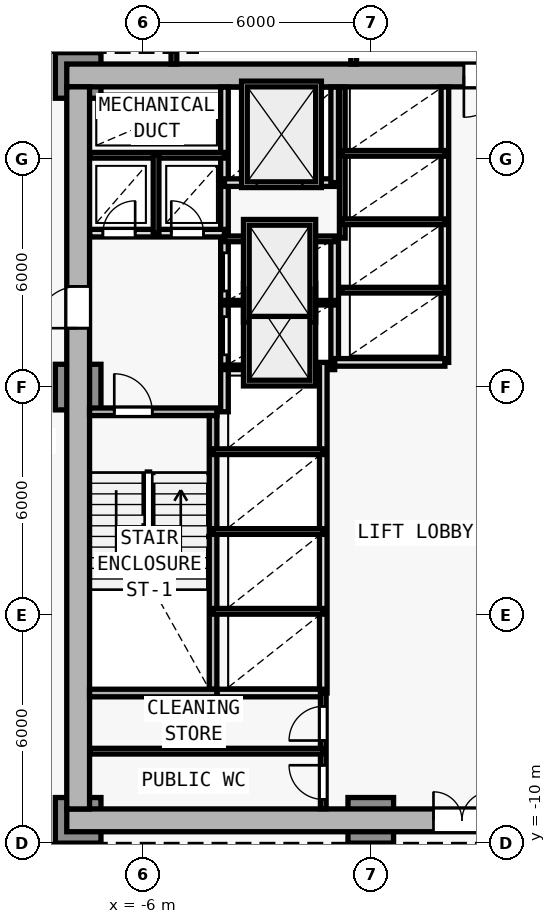
"""IFC4 building model, lengths in metres.
Left out: names, types, materials, properties, quantities, classifications, styles, units other than length and angle.
Written with IfcOpenShell. Run it as: python <this file> out.ifc"""

import sys

from ifc_helpers import new_model, si_unit, direction, frame, frame_2d, origin, origin_2d, place, context, subcontext, project, spatial, rectangle, extrude, element, fill, save


model = new_model("IFC4")
c1 = context("Model", 3, precision=1e-05, world=origin(), true_north=direction((0.0, 1.0)))
c2 = subcontext(c1, "Body", "Model", "MODEL_VIEW")
j1 = project(units=[si_unit("LENGTHUNIT", "METRE"), si_unit("PLANEANGLEUNIT", "RADIAN")], contexts=[c1])
p1 = place(None, origin())
s1 = spatial("IfcSite", under=j1, at=p1, CompositionType="ELEMENT")
p2 = place(p1, origin())
s2 = spatial("IfcBuilding", under=s1, at=p2, CompositionType="ELEMENT")
p3 = place(p2, frame((0.0, 0.0, 5.0)))
s3 = spatial("IfcBuildingStorey", under=s2, at=p3, CompositionType="ELEMENT", Elevation=5.0)
for number, where, z_axis, x_axis in (
    (1, (-7.7, -9.4, 0.0), (0.0, 0.0, 1.0), (1.0, 0.0, 0.0)),
    (2, (-7.7, 10.2, 0.0), (0.0, 0.0, 1.0), (1.0, 0.0, 0.0)),
    (3, (0.0, -9.4, 0.0), (0.0, 0.0, 1.0), (1.0, 0.0, 0.0)),
    (4, (-7.7, 2.0, 0.0), (0.0, 0.0, 1.0), (1.0, 0.0, 0.0)),
):
    element("IfcColumn", number, at=place(p3, frame(where, z_axis=z_axis, x_axis=x_axis)), inside=s3, PredefinedType="COLUMN", context=c2, shape_type="SweptSolid", body=[
        extrude(rectangle(XDim=1.2, YDim=1.2, at=origin_2d()), origin(), (0.0, 0.0, 1.0), 4.2),
    ])
p4 = place(p3, frame((-8.0, -9.4, 0.0), z_axis=(0.0, 0.0, 1.0), x_axis=(1.0, 0.0, 0.0)))
e5 = element("IfcWall", 5, at=p4, inside=s3, PredefinedType="SHEAR", context=c2, shape_type="SweptSolid", body=[
    extrude(rectangle(XDim=16.0, YDim=0.6, at=frame_2d((8.0, 0.0))), origin(), (0.0, 0.0, 1.0), 3.92),
])
p5 = place(p4, frame((9.65, 0.0, 0.0)))
e6 = element("IfcOpeningElement", 6, at=p5, cuts=e5, PredefinedType="OPENING", context=c2, shape_type="SweptSolid", body=[
    extrude(rectangle(XDim=1.5, YDim=2.2, at=frame_2d((0.75, 1.1))), frame((0.0, 0.31, 0.0), z_axis=(0.0, -1.0, 0.0), x_axis=(1.0, 0.0, 0.0)), (0.0, 0.0, 1.0), 0.62),
])
p6 = place(p3, frame((8.0, 10.2, 0.0), z_axis=(0.0, 0.0, 1.0), x_axis=(-1.0, 0.0, 0.0)))
e7 = element("IfcWall", 7, at=p6, inside=s3, PredefinedType="SHEAR", context=c2, shape_type="SweptSolid", body=[
    extrude(rectangle(XDim=16.0, YDim=0.6, at=frame_2d((8.0, 0.0))), origin(), (0.0, 0.0, 1.0), 3.92),
])
p7 = place(p6, frame((4.45, 0.0, 0.0)))
e8 = element("IfcOpeningElement", 8, at=p7, cuts=e7, PredefinedType="OPENING", context=c2, shape_type="SweptSolid", body=[
    extrude(rectangle(XDim=1.1, YDim=2.15, at=frame_2d((0.55, 1.075))), frame((0.0, 0.31, 0.0), z_axis=(0.0, -1.0, 0.0), x_axis=(1.0, 0.0, 0.0)), (0.0, 0.0, 1.0), 0.62),
])
p8 = place(p3, frame((-7.7, -9.1, 0.0), z_axis=(0.0, 0.0, 1.0), x_axis=(0.0, 1.0, 0.0)))
e9 = element("IfcWall", 9, at=p8, inside=s3, PredefinedType="SHEAR", context=c2, shape_type="SweptSolid", body=[
    extrude(rectangle(XDim=19.0, YDim=0.6, at=frame_2d((9.5, 0.0))), origin(), (0.0, 0.0, 1.0), 3.92),
])
p9 = place(p8, frame((12.65, 0.0, 0.0)))
e10 = element("IfcOpeningElement", 10, at=p9, cuts=e9, PredefinedType="OPENING", context=c2, shape_type="SweptSolid", body=[
    extrude(rectangle(XDim=1.1, YDim=2.15, at=frame_2d((0.55, 1.075))), frame((0.0, 0.31, 0.0), z_axis=(0.0, -1.0, 0.0), x_axis=(1.0, 0.0, 0.0)), (0.0, 0.0, 1.0), 0.62),
])
p10 = place(p3, frame((-7.4, 1.35, 0.0), z_axis=(0.0, 0.0, 1.0), x_axis=(1.0, 0.0, 0.0)))
e11 = element("IfcWall", 11, at=p10, inside=s3, PredefinedType="SOLIDWALL", context=c2, shape_type="SweptSolid", body=[
    extrude(rectangle(XDim=3.35, YDim=0.2, at=frame_2d((1.675, 0.0))), origin(), (0.0, 0.0, 1.0), 3.92),
])
p11 = place(p10, frame((0.65, 0.0, 0.0)))
e12 = element("IfcOpeningElement", 12, at=p11, cuts=e11, PredefinedType="OPENING", context=c2, shape_type="SweptSolid", body=[
    extrude(rectangle(XDim=1.0, YDim=2.15, at=frame_2d((0.5, 1.075))), frame((0.0, 0.11, 0.0), z_axis=(0.0, -1.0, 0.0), x_axis=(1.0, 0.0, 0.0)), (0.0, 0.0, 1.0), 0.22),
])
p12 = place(p3, frame((-4.15, -5.95, 0.0), z_axis=(0.0, 0.0, 1.0), x_axis=(0.0, 1.0, 0.0)))
e13 = element("IfcWall", 13, at=p12, inside=s3, PredefinedType="SOLIDWALL", context=c2, shape_type="SweptSolid", body=[
    extrude(rectangle(XDim=7.2, YDim=0.2, at=frame_2d((3.6, 0.0))), origin(), (0.0, 0.0, 1.0), 3.92),
])
p13 = place(p3, frame((-3.85, 1.35, 0.0), z_axis=(0.0, 0.0, 1.0), x_axis=(0.0, 1.0, 0.0)))
e14 = element("IfcWall", 14, at=p13, inside=s3, PredefinedType="SOLIDWALL", context=c2, shape_type="SweptSolid", body=[
    extrude(rectangle(XDim=8.545, YDim=0.2, at=frame_2d((4.272, 0.0))), origin(), (0.0, 0.0, 1.0), 3.92),
])
p14 = place(p13, frame((1.5, 0.0, 0.0)))
e15 = element("IfcOpeningElement", 15, at=p14, cuts=e14, PredefinedType="OPENING", context=c2, shape_type="SweptSolid", body=[
    extrude(rectangle(XDim=1.0, YDim=2.15, at=frame_2d((0.5, 1.075))), frame((0.0, 0.11, 0.0), z_axis=(0.0, -1.0, 0.0), x_axis=(1.0, 0.0, 0.0)), (0.0, 0.0, 1.0), 0.22),
])
p15 = place(p13, frame((3.18, 0.0, 0.0)))
e16 = element("IfcOpeningElement", 16, at=p15, cuts=e14, PredefinedType="OPENING", context=c2, shape_type="SweptSolid", body=[
    extrude(rectangle(XDim=1.0, YDim=2.15, at=frame_2d((0.5, 1.075))), frame((0.0, 0.11, 0.0), z_axis=(0.0, -1.0, 0.0), x_axis=(1.0, 0.0, 0.0)), (0.0, 0.0, 1.0), 0.22),
])
p16 = place(p3, frame((-7.395, 6.05, 0.0), z_axis=(0.0, 0.0, 1.0), x_axis=(1.0, 0.0, 0.0)))
e17 = element("IfcWall", 17, at=p16, inside=s3, PredefinedType="SOLIDWALL", context=c2, shape_type="SweptSolid", body=[
    extrude(rectangle(XDim=3.545, YDim=0.2, at=frame_2d((1.772, 0.0))), origin(), (0.0, 0.0, 1.0), 3.92),
])
p17 = place(p16, frame((0.345, 0.0, 0.0)))
e18 = element("IfcOpeningElement", 18, at=p17, cuts=e17, PredefinedType="OPENING", context=c2, shape_type="SweptSolid", body=[
    extrude(rectangle(XDim=0.85, YDim=2.1, at=frame_2d((0.425, 1.05))), frame((0.0, 0.11, 0.0), z_axis=(0.0, -1.0, 0.0), x_axis=(1.0, 0.0, 0.0)), (0.0, 0.0, 1.0), 0.22),
])
p18 = place(p16, frame((2.145, 0.0, 0.0)))
e19 = element("IfcOpeningElement", 19, at=p18, cuts=e17, PredefinedType="OPENING", context=c2, shape_type="SweptSolid", body=[
    extrude(rectangle(XDim=0.85, YDim=2.1, at=frame_2d((0.425, 1.05))), frame((0.0, 0.11, 0.0), z_axis=(0.0, -1.0, 0.0), x_axis=(1.0, 0.0, 0.0)), (0.0, 0.0, 1.0), 0.22),
])
p19 = place(p3, frame((-7.395, 8.1, 0.0), z_axis=(0.0, 0.0, 1.0), x_axis=(1.0, 0.0, 0.0)))
e20 = element("IfcWall", 20, at=p19, inside=s3, PredefinedType="PARTITIONING", context=c2, shape_type="SweptSolid", body=[
    extrude(rectangle(XDim=3.545, YDim=0.15, at=frame_2d((1.772, 0.0))), origin(), (0.0, 0.0, 1.0), 3.92),
])
p20 = place(p3, frame((-5.65, 6.05, 0.0), z_axis=(0.0, 0.0, 1.0), x_axis=(0.0, 1.0, 0.0)))
e21 = element("IfcWall", 21, at=p20, inside=s3, PredefinedType="PARTITIONING", context=c2, shape_type="SweptSolid", body=[
    extrude(rectangle(XDim=2.05, YDim=0.15, at=frame_2d((1.025, 0.0))), origin(), (0.0, 0.0, 1.0), 3.92),
])
p21 = place(p3, frame((-0.95, 2.65, 0.0), z_axis=(0.0, 0.0, 1.0), x_axis=(0.0, 1.0, 0.0)))
e22 = element("IfcWall", 22, at=p21, inside=s3, PredefinedType="SOLIDWALL", context=c2, shape_type="SweptSolid", body=[
    extrude(rectangle(XDim=3.27, YDim=0.2, at=frame_2d((1.635, 0.0))), origin(), (0.0, 0.0, 1.0), 3.92),
])
for number, where, z_axis, x_axis in (
    (23, (-3.85, 2.52, 0.0), (0.0, 0.0, 1.0), (1.0, 0.0, 0.0)),
    (24, (-3.85, 4.22, 0.0), (0.0, 0.0, 1.0), (1.0, 0.0, 0.0)),
):
    element("IfcWall", number, at=place(p3, frame(where, z_axis=z_axis, x_axis=x_axis)), inside=s3, PredefinedType="PARTITIONING", context=c2, shape_type="SweptSolid", body=[
        extrude(rectangle(XDim=2.9, YDim=0.12, at=frame_2d((1.45, 0.0))), origin(), (0.0, 0.0, 1.0), 3.92),
    ])
p22 = place(p3, frame((-3.85, 5.9, 0.0), z_axis=(0.0, 0.0, 1.0), x_axis=(1.0, 0.0, 0.0)))
e25 = element("IfcWall", 25, at=p22, inside=s3, PredefinedType="PARTITIONING", context=c2, shape_type="SweptSolid", body=[
    extrude(rectangle(XDim=2.9, YDim=0.15, at=frame_2d((1.45, 0.0))), origin(), (0.0, 0.0, 1.0), 3.92),
])
p23 = place(p3, frame((-3.85, 7.38, 0.0), z_axis=(0.0, 0.0, 1.0), x_axis=(1.0, 0.0, 0.0)))
e26 = element("IfcWall", 26, at=p23, inside=s3, PredefinedType="SOLIDWALL", context=c2, shape_type="SweptSolid", body=[
    extrude(rectangle(XDim=2.9, YDim=0.2, at=frame_2d((1.45, 0.0))), origin(), (0.0, 0.0, 1.0), 3.92),
])
p24 = place(p23, frame((0.85, 0.0, 0.0)))
e27 = element("IfcOpeningElement", 27, at=p24, cuts=e26, PredefinedType="OPENING", context=c2, shape_type="SweptSolid", body=[
    extrude(rectangle(XDim=1.2, YDim=2.2, at=frame_2d((0.6, 1.1))), frame((0.0, 0.11, 0.0), z_axis=(0.0, -1.0, 0.0), x_axis=(1.0, 0.0, 0.0)), (0.0, 0.0, 1.0), 0.22),
])
p25 = place(p3, frame((-0.95, 7.38, 0.0), z_axis=(0.0, 0.0, 1.0), x_axis=(0.0, 1.0, 0.0)))
e28 = element("IfcWall", 28, at=p25, inside=s3, PredefinedType="SOLIDWALL", context=c2, shape_type="SweptSolid", body=[
    extrude(rectangle(XDim=2.515, YDim=0.2, at=frame_2d((1.258, 0.0))), origin(), (0.0, 0.0, 1.0), 3.92),
])
p26 = place(p3, frame((-1.25, -6.05, 0.0), z_axis=(0.0, 0.0, 1.0), x_axis=(0.0, 1.0, 0.0)))
e29 = element("IfcWall", 29, at=p26, inside=s3, PredefinedType="SOLIDWALL", context=c2, shape_type="SweptSolid", body=[
    extrude(rectangle(XDim=8.7, YDim=0.2, at=frame_2d((4.35, 0.0))), origin(), (0.0, 0.0, 1.0), 3.92),
])
for number, where, z_axis, x_axis in (
    (30, (-4.15, -3.9, 0.0), (0.0, 0.0, 1.0), (1.0, 0.0, 0.0)),
    (31, (-4.15, -1.8, 0.0), (0.0, 0.0, 1.0), (1.0, 0.0, 0.0)),
    (32, (-4.15, 0.3, 0.0), (0.0, 0.0, 1.0), (1.0, 0.0, 0.0)),
):
    element("IfcWall", number, at=place(p3, frame(where, z_axis=z_axis, x_axis=x_axis)), inside=s3, PredefinedType="PARTITIONING", context=c2, shape_type="SweptSolid", body=[
        extrude(rectangle(XDim=2.9, YDim=0.15, at=frame_2d((1.45, 0.0))), origin(), (0.0, 0.0, 1.0), 3.92),
    ])
p27 = place(p3, frame((1.95, 2.65, 0.0), z_axis=(0.0, 0.0, 1.0), x_axis=(0.0, 1.0, 0.0)))
e33 = element("IfcWall", 33, at=p27, inside=s3, PredefinedType="SOLIDWALL", context=c2, shape_type="SweptSolid", body=[
    extrude(rectangle(XDim=7.245, YDim=0.2, at=frame_2d((3.623, 0.0))), origin(), (0.0, 0.0, 1.0), 3.92),
])
p28 = place(p3, frame((-0.95, 2.65, 0.0), z_axis=(0.0, 0.0, 1.0), x_axis=(1.0, 0.0, 0.0)))
e34 = element("IfcWall", 34, at=p28, inside=s3, PredefinedType="SOLIDWALL", context=c2, shape_type="SweptSolid", body=[
    extrude(rectangle(XDim=2.9, YDim=0.2, at=frame_2d((1.45, 0.0))), origin(), (0.0, 0.0, 1.0), 3.92),
])
p29 = place(p3, frame((-0.75, 5.92, 0.0), z_axis=(0.0, 0.0, 1.0), x_axis=(0.0, 1.0, 0.0)))
e35 = element("IfcWall", 35, at=p29, inside=s3, PredefinedType="PARTITIONING", context=c2, shape_type="SweptSolid", body=[
    extrude(rectangle(XDim=3.975, YDim=0.15, at=frame_2d((1.988, 0.0))), origin(), (0.0, 0.0, 1.0), 3.92),
])
for number, where, z_axis, x_axis in (
    (36, (-0.75, 4.55, 0.0), (0.0, 0.0, 1.0), (1.0, 0.0, 0.0)),
    (37, (-0.75, 6.35, 0.0), (0.0, 0.0, 1.0), (1.0, 0.0, 0.0)),
    (38, (-0.75, 8.15, 0.0), (0.0, 0.0, 1.0), (1.0, 0.0, 0.0)),
):
    element("IfcWall", number, at=place(p3, frame(where, z_axis=z_axis, x_axis=x_axis)), inside=s3, PredefinedType="PARTITIONING", context=c2, shape_type="SweptSolid", body=[
        extrude(rectangle(XDim=2.7, YDim=0.15, at=frame_2d((1.35, 0.0))), origin(), (0.0, 0.0, 1.0), 3.92),
    ])
p30 = place(p3, frame((-7.4, -6.05, 0.0), z_axis=(0.0, 0.0, 1.0), x_axis=(1.0, 0.0, 0.0)))
e39 = element("IfcWall", 39, at=p30, inside=s3, PredefinedType="SOLIDWALL", context=c2, shape_type="SweptSolid", body=[
    extrude(rectangle(XDim=3.35, YDim=0.2, at=frame_2d((1.675, 0.0))), origin(), (0.0, 0.0, 1.0), 3.92),
])
p31 = place(p3, frame((-4.04, -6.05, 0.0), z_axis=(0.0, 0.0, 1.0), x_axis=(1.0, 0.0, 0.0)))
e40 = element("IfcWall", 40, at=p31, inside=s3, PredefinedType="SOLIDWALL", context=c2, shape_type="SweptSolid", body=[
    extrude(rectangle(XDim=2.79, YDim=0.2, at=frame_2d((1.395, 0.0))), origin(), (0.0, 0.0, 1.0), 3.92),
])
p32 = place(p3, frame((-1.25, -9.095, 0.0), z_axis=(0.0, 0.0, 1.0), x_axis=(0.0, 1.0, 0.0)))
e41 = element("IfcWall", 41, at=p32, inside=s3, PredefinedType="PARTITIONING", context=c2, shape_type="SweptSolid", body=[
    extrude(rectangle(XDim=3.045, YDim=0.15, at=frame_2d((1.522, 0.0))), origin(), (0.0, 0.0, 1.0), 3.92),
])
p33 = place(p32, frame((1.795, 0.0, 0.0)))
e42 = element("IfcOpeningElement", 42, at=p33, cuts=e41, PredefinedType="OPENING", context=c2, shape_type="SweptSolid", body=[
    extrude(rectangle(XDim=0.9, YDim=2.1, at=frame_2d((0.45, 1.05))), frame((0.0, 0.085, 0.0), z_axis=(0.0, -1.0, 0.0), x_axis=(1.0, 0.0, 0.0)), (0.0, 0.0, 1.0), 0.17),
])
p34 = place(p32, frame((0.245, 0.0, 0.0)))
e43 = element("IfcOpeningElement", 43, at=p34, cuts=e41, PredefinedType="OPENING", context=c2, shape_type="SweptSolid", body=[
    extrude(rectangle(XDim=0.9, YDim=2.1, at=frame_2d((0.45, 1.05))), frame((0.0, 0.085, 0.0), z_axis=(0.0, -1.0, 0.0), x_axis=(1.0, 0.0, 0.0)), (0.0, 0.0, 1.0), 0.17),
])
p35 = place(p3, frame((-7.395, -7.58, 0.0), z_axis=(0.0, 0.0, 1.0), x_axis=(1.0, 0.0, 0.0)))
e44 = element("IfcWall", 44, at=p35, inside=s3, PredefinedType="PARTITIONING", context=c2, shape_type="SweptSolid", body=[
    extrude(rectangle(XDim=6.145, YDim=0.15, at=frame_2d((3.073, 0.0))), origin(), (0.0, 0.0, 1.0), 3.92),
])
p36 = place(p3, frame((-5.18, 10.5, 0.0), z_axis=(0.0, 0.0, 1.0), x_axis=(0.0, 1.0, 0.0)))
e45 = element("IfcWall", 45, at=p36, inside=s3, PredefinedType="PARTITIONING", context=c2, shape_type="SweptSolid", body=[
    extrude(rectangle(XDim=7.78, YDim=0.15, at=frame_2d((3.89, 0.0))), origin(), (0.0, 0.0, 1.0), 3.92),
])
p37 = place(p36, frame((1.849, 0.0, 0.0)))
e46 = element("IfcOpeningElement", 46, at=p37, cuts=e45, PredefinedType="OPENING", context=c2, shape_type="SweptSolid", body=[
    extrude(rectangle(XDim=0.9, YDim=2.1, at=frame_2d((0.45, 1.05))), frame((0.0, 0.085, 0.0), z_axis=(0.0, -1.0, 0.0), x_axis=(1.0, 0.0, 0.0)), (0.0, 0.0, 1.0), 0.17),
])
p38 = place(p3, frame((-0.45, 10.5, 0.0), z_axis=(0.0, 0.0, 1.0), x_axis=(0.0, 1.0, 0.0)))
e47 = element("IfcWall", 47, at=p38, inside=s3, PredefinedType="PARTITIONING", context=c2, shape_type="SweptSolid", body=[
    extrude(rectangle(XDim=4.75, YDim=0.15, at=frame_2d((2.375, 0.0))), origin(), (0.0, 0.0, 1.0), 3.92),
])
p39 = place(p5, origin())
e48 = element("IfcDoor", 48, at=p39, inside=s3, OperationType="DOUBLE_DOOR_SINGLE_SWING", PredefinedType="DOOR", context=c2, shape_type="SweptSolid", body=[
    extrude(rectangle(XDim=1.5, YDim=2.2, at=frame_2d((0.75, 1.1))), frame((0.0, 0.025, 0.0), z_axis=(0.0, -1.0, 0.0), x_axis=(1.0, 0.0, 0.0)), (0.0, 0.0, 1.0), 0.05),
])
fill(e6, e48)
p40 = place(p9, origin())
e49 = element("IfcDoor", 49, at=p40, inside=s3, OperationType="SINGLE_SWING_LEFT", PredefinedType="DOOR", context=c2, shape_type="SweptSolid", body=[
    extrude(rectangle(XDim=1.1, YDim=2.15, at=frame_2d((0.55, 1.075))), frame((0.0, 0.025, 0.0), z_axis=(0.0, -1.0, 0.0), x_axis=(1.0, 0.0, 0.0)), (0.0, 0.0, 1.0), 0.05),
])
fill(e10, e49)
p41 = place(p7, origin())
e50 = element("IfcDoor", 50, at=p41, inside=s3, OperationType="SINGLE_SWING_RIGHT", PredefinedType="DOOR", context=c2, shape_type="SweptSolid", body=[
    extrude(rectangle(XDim=1.1, YDim=2.15, at=frame_2d((0.55, 1.075))), frame((0.0, 0.025, 0.0), z_axis=(0.0, -1.0, 0.0), x_axis=(1.0, 0.0, 0.0)), (0.0, 0.0, 1.0), 0.05),
])
fill(e8, e50)
p42 = place(p11, origin())
e51 = element("IfcDoor", 51, at=p42, inside=s3, OperationType="SINGLE_SWING_LEFT", PredefinedType="DOOR", context=c2, shape_type="SweptSolid", body=[
    extrude(rectangle(XDim=1.0, YDim=2.15, at=frame_2d((0.5, 1.075))), frame((0.0, 0.025, 0.0), z_axis=(0.0, -1.0, 0.0), x_axis=(1.0, 0.0, 0.0)), (0.0, 0.0, 1.0), 0.05),
])
fill(e12, e51)
p43 = place(p17, origin())
e52 = element("IfcDoor", 52, at=p43, inside=s3, OperationType="SINGLE_SWING_RIGHT", PredefinedType="DOOR", context=c2, shape_type="SweptSolid", body=[
    extrude(rectangle(XDim=0.85, YDim=2.1, at=frame_2d((0.425, 1.05))), frame((0.0, 0.025, 0.0), z_axis=(0.0, -1.0, 0.0), x_axis=(1.0, 0.0, 0.0)), (0.0, 0.0, 1.0), 0.05),
])
fill(e18, e52)
p44 = place(p18, origin())
e53 = element("IfcDoor", 53, at=p44, inside=s3, OperationType="SINGLE_SWING_LEFT", PredefinedType="DOOR", context=c2, shape_type="SweptSolid", body=[
    extrude(rectangle(XDim=0.85, YDim=2.1, at=frame_2d((0.425, 1.05))), frame((0.0, 0.025, 0.0), z_axis=(0.0, -1.0, 0.0), x_axis=(1.0, 0.0, 0.0)), (0.0, 0.0, 1.0), 0.05),
])
fill(e19, e53)
p45 = place(p24, origin())
e54 = element("IfcDoor", 54, at=p45, inside=s3, OperationType="DOUBLE_DOOR_SLIDING", PredefinedType="DOOR", context=c2, shape_type="SweptSolid", body=[
    extrude(rectangle(XDim=1.2, YDim=2.2, at=frame_2d((0.6, 1.1))), frame((0.0, 0.025, 0.0), z_axis=(0.0, -1.0, 0.0), x_axis=(1.0, 0.0, 0.0)), (0.0, 0.0, 1.0), 0.05),
])
fill(e27, e54)
p46 = place(p14, origin())
e55 = element("IfcDoor", 55, at=p46, inside=s3, OperationType="DOUBLE_DOOR_SLIDING", PredefinedType="DOOR", context=c2, shape_type="SweptSolid", body=[
    extrude(rectangle(XDim=1.0, YDim=2.15, at=frame_2d((0.5, 1.075))), frame((0.0, 0.025, 0.0), z_axis=(0.0, -1.0, 0.0), x_axis=(1.0, 0.0, 0.0)), (0.0, 0.0, 1.0), 0.05),
])
fill(e15, e55)
p47 = place(p15, origin())
e56 = element("IfcDoor", 56, at=p47, inside=s3, OperationType="DOUBLE_DOOR_SLIDING", PredefinedType="DOOR", context=c2, shape_type="SweptSolid", body=[
    extrude(rectangle(XDim=1.0, YDim=2.15, at=frame_2d((0.5, 1.075))), frame((0.0, 0.025, 0.0), z_axis=(0.0, -1.0, 0.0), x_axis=(1.0, 0.0, 0.0)), (0.0, 0.0, 1.0), 0.05),
])
fill(e16, e56)
p48 = place(p33, origin())
e57 = element("IfcDoor", 57, at=p48, inside=s3, OperationType="SINGLE_SWING_LEFT", PredefinedType="DOOR", context=c2, shape_type="SweptSolid", body=[
    extrude(rectangle(XDim=0.9, YDim=2.1, at=frame_2d((0.45, 1.05))), frame((0.0, 0.025, 0.0), z_axis=(0.0, -1.0, 0.0), x_axis=(1.0, 0.0, 0.0)), (0.0, 0.0, 1.0), 0.05),
])
fill(e42, e57)
p49 = place(p34, origin())
e58 = element("IfcDoor", 58, at=p49, inside=s3, OperationType="SINGLE_SWING_RIGHT", PredefinedType="DOOR", context=c2, shape_type="SweptSolid", body=[
    extrude(rectangle(XDim=0.9, YDim=2.1, at=frame_2d((0.45, 1.05))), frame((0.0, 0.025, 0.0), z_axis=(0.0, -1.0, 0.0), x_axis=(1.0, 0.0, 0.0)), (0.0, 0.0, 1.0), 0.05),
])
fill(e43, e58)
save(model, sys.argv[1])
